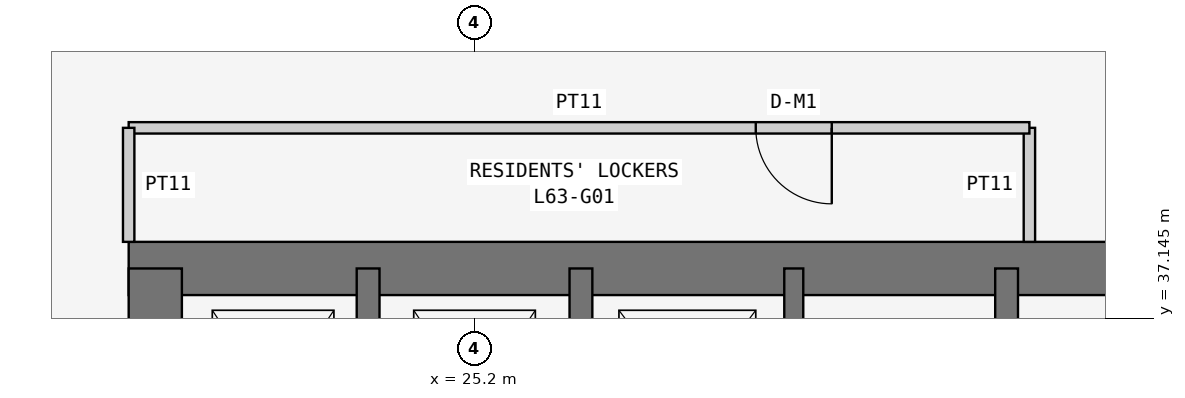
"""IFC4 building model, lengths in metres.
Left out: names, types, materials, properties, quantities, classifications, styles, units other than length and angle.
Written with IfcOpenShell. Run it as: python <this file> out.ifc"""

import sys

from ifc_helpers import new_model, si_unit, direction, frame, frame_2d, origin, place, context, subcontext, project, spatial, rectangle, extrude, element, fill, save


model = new_model("IFC4")
c1 = context("Model", 3, precision=1e-05, world=origin(), true_north=direction((0.0, 1.0)))
c2 = subcontext(c1, "Body", "Model", "MODEL_VIEW")
j1 = project(units=[si_unit("LENGTHUNIT", "METRE"), si_unit("PLANEANGLEUNIT", "RADIAN")], contexts=[c1])
p1 = place(None, origin())
s1 = spatial("IfcSite", under=j1, at=p1, CompositionType="ELEMENT")
p2 = place(p1, origin())
s2 = spatial("IfcBuilding", under=s1, at=p2, CompositionType="ELEMENT")
p3 = place(p2, frame((0.0, 0.0, 240.9)))
s3 = spatial("IfcBuildingStorey", under=s2, at=p3, CompositionType="ELEMENT", Elevation=240.9)
p4 = place(p3, frame((37.8, 37.8, 0.0), z_axis=(0.0, 0.0, 1.0), x_axis=(-1.0, 0.0, 0.0)))
e1 = element("IfcWall", 1, at=p4, inside=s3, PredefinedType="SHEAR", context=c2, shape_type="SweptSolid", body=[
    extrude(rectangle(XDim=17.15, YDim=0.7, at=frame_2d((8.575, 0.0))), origin(), (0.0, 0.0, 1.0), 3.6),
])
p5 = place(p3, frame((21.0, 37.8, 0.0), z_axis=(0.0, 0.0, 1.0), x_axis=(0.0, -1.0, 0.0)))
e2 = element("IfcWall", 2, at=p5, inside=s3, PredefinedType="SHEAR", context=c2, shape_type="SweptSolid", body=[
    extrude(rectangle(XDim=17.15, YDim=0.7, at=frame_2d((8.575, 0.0))), origin(), (0.0, 0.0, 1.0), 3.6),
])
p6 = place(p5, frame((5.4, 0.0, 0.0)))
e3 = element("IfcOpeningElement", 3, at=p6, cuts=e2, PredefinedType="OPENING", context=c2, shape_type="SweptSolid", body=[
    extrude(rectangle(XDim=1.2, YDim=2.1, at=frame_2d((0.6, 1.05))), frame((0.0, 0.36, 0.0), z_axis=(0.0, -1.0, 0.0), x_axis=(1.0, 0.0, 0.0)), (0.0, 0.0, 1.0), 0.72),
])
p7 = place(p3, frame((26.6, 21.0, 0.0), z_axis=(0.0, 0.0, 1.0), x_axis=(0.0, 1.0, 0.0)))
e4 = element("IfcWall", 4, at=p7, inside=s3, PredefinedType="SHEAR", context=c2, shape_type="SweptSolid", body=[
    extrude(rectangle(XDim=16.8, YDim=0.3, at=frame_2d((8.4, 0.0))), origin(), (0.0, 0.0, 1.0), 3.6),
])
p8 = place(p7, frame((10.4, 0.0, 0.0)))
e5 = element("IfcOpeningElement", 5, at=p8, cuts=e4, PredefinedType="OPENING", context=c2, shape_type="SweptSolid", body=[
    extrude(rectangle(XDim=1.2, YDim=2.1, at=frame_2d((0.6, 1.05))), frame((0.0, 0.16, 0.0), z_axis=(0.0, -1.0, 0.0), x_axis=(1.0, 0.0, 0.0)), (0.0, 0.0, 1.0), 0.32),
])
p9 = place(p3, frame((23.8, 34.6, 0.0), z_axis=(0.0, 0.0, 1.0), x_axis=(0.0, 1.0, 0.0)))
e6 = element("IfcWall", 6, at=p9, inside=s3, PredefinedType="SHEAR", context=c2, shape_type="SweptSolid", body=[
    extrude(rectangle(XDim=3.2, YDim=0.3, at=frame_2d((1.6, 0.0))), origin(), (0.0, 0.0, 1.0), 3.6),
])
p10 = place(p3, frame((32.2, 29.25, 0.0), z_axis=(0.0, 0.0, 1.0), x_axis=(0.0, 1.0, 0.0)))
e7 = element("IfcWall", 7, at=p10, inside=s3, PredefinedType="SHEAR", context=c2, shape_type="SweptSolid", body=[
    extrude(rectangle(XDim=8.55, YDim=0.3, at=frame_2d((4.275, 0.0))), origin(), (0.0, 0.0, 1.0), 3.6),
])
p11 = place(p3, frame((29.4, 34.6, 0.0), z_axis=(0.0, 0.0, 1.0), x_axis=(0.0, 1.0, 0.0)))
e8 = element("IfcWall", 8, at=p11, inside=s3, PredefinedType="SHEAR", context=c2, shape_type="SweptSolid", body=[
    extrude(rectangle(XDim=3.2, YDim=0.25, at=frame_2d((1.6, 0.0))), origin(), (0.0, 0.0, 1.0), 3.6),
])
p12 = place(p3, frame((32.5, 38.15, 0.0), z_axis=(0.0, 0.0, 1.0), x_axis=(0.0, 1.0, 0.0)))
e9 = element("IfcWall", 9, at=p12, inside=s3, PredefinedType="PARTITIONING", context=c2, shape_type="SweptSolid", body=[
    extrude(rectangle(XDim=1.5, YDim=0.15, at=frame_2d((0.75, 0.0))), origin(), (0.0, 0.0, 1.0), 3.45),
])
p13 = place(p3, frame((32.5, 39.65, 0.0), z_axis=(0.0, 0.0, 1.0), x_axis=(-1.0, 0.0, 0.0)))
e10 = element("IfcWall", 10, at=p13, inside=s3, PredefinedType="PARTITIONING", context=c2, shape_type="SweptSolid", body=[
    extrude(rectangle(XDim=11.85, YDim=0.15, at=frame_2d((5.925, 0.0))), origin(), (0.0, 0.0, 1.0), 3.45),
])
p14 = place(p13, frame((2.6, 0.0, 0.0)))
e11 = element("IfcOpeningElement", 11, at=p14, cuts=e10, PredefinedType="OPENING", context=c2, shape_type="SweptSolid", body=[
    extrude(rectangle(XDim=1.0, YDim=2.1, at=frame_2d((0.5, 1.05))), frame((0.0, 0.085, 0.0), z_axis=(0.0, -1.0, 0.0), x_axis=(1.0, 0.0, 0.0)), (0.0, 0.0, 1.0), 0.17),
])
p15 = place(p3, frame((20.65, 39.65, 0.0), z_axis=(0.0, 0.0, 1.0), x_axis=(0.0, -1.0, 0.0)))
e12 = element("IfcWall", 12, at=p15, inside=s3, PredefinedType="PARTITIONING", context=c2, shape_type="SweptSolid", body=[
    extrude(rectangle(XDim=1.5, YDim=0.15, at=frame_2d((0.75, 0.0))), origin(), (0.0, 0.0, 1.0), 3.45),
])
p16 = place(p14, origin())
e13 = element("IfcDoor", 13, at=p16, inside=s3, OperationType="SINGLE_SWING_LEFT", PredefinedType="DOOR", context=c2, shape_type="SweptSolid", body=[
    extrude(rectangle(XDim=1.0, YDim=2.1, at=frame_2d((0.5, 1.05))), frame((0.0, 0.025, 0.0), z_axis=(0.0, -1.0, 0.0), x_axis=(1.0, 0.0, 0.0)), (0.0, 0.0, 1.0), 0.05),
])
fill(e11, e13)
save(model, sys.argv[1])
